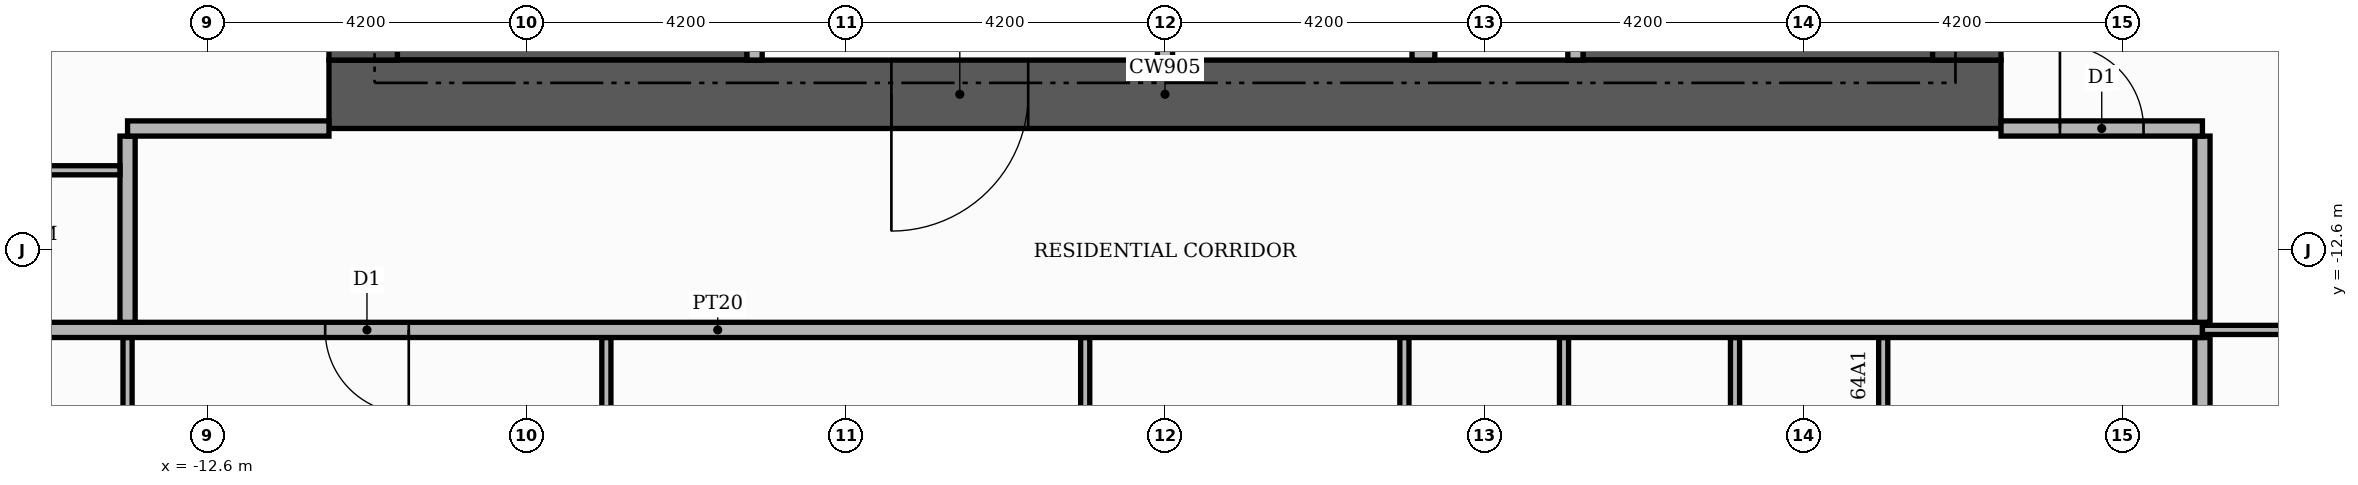
"""IFC4 building model, lengths in metres.
Left out: names, types, materials, properties, quantities, classifications, styles, units other than length and angle.
Written with IfcOpenShell. Run it as: python <this file> out.ifc"""

import sys

from ifc_helpers import new_model, si_unit, direction, frame, frame_2d, origin, place, context, subcontext, project, spatial, rectangle, extrude, element, fill, save


model = new_model("IFC4")
c1 = context("Model", 3, precision=1e-05, world=origin(), true_north=direction((0.0, 1.0)))
c2 = subcontext(c1, "Body", "Model", "MODEL_VIEW")
j1 = project(units=[si_unit("LENGTHUNIT", "METRE"), si_unit("PLANEANGLEUNIT", "RADIAN")], contexts=[c1])
p1 = place(None, origin())
s1 = spatial("IfcSite", under=j1, at=p1, CompositionType="ELEMENT")
p2 = place(p1, origin())
s2 = spatial("IfcBuilding", under=s1, at=p2, CompositionType="ELEMENT")
p3 = place(p2, frame((0.0, 0.0, 267.9)))
s3 = spatial("IfcBuildingStorey", under=s2, at=p3, CompositionType="ELEMENT", Elevation=267.9)
for number, where, z_axis, x_axis in (
    (1, (-10.1, -9.15, 0.0), (0.0, 0.0, 1.0), (1.0, 0.0, 0.0)),
    (2, (5.5, -9.15, 0.0), (0.0, 0.0, 1.0), (1.0, 0.0, 0.0)),
):
    element("IfcWall", number, at=place(p3, frame(where, z_axis=z_axis, x_axis=x_axis)), inside=s3, PredefinedType="SHEAR", context=c2, shape_type="SweptSolid", body=[
        extrude(rectangle(XDim=4.6, YDim=1.9, at=frame_2d((2.3, 0.0))), origin(), (0.0, 0.0, 1.0), 3.48),
    ])
p4 = place(p3, frame((-11.0, -10.55, 0.0), z_axis=(0.0, 0.0, 1.0), x_axis=(1.0, 0.0, 0.0)))
e3 = element("IfcWall", 3, at=p4, inside=s3, PredefinedType="SHEAR", context=c2, shape_type="SweptSolid", body=[
    extrude(rectangle(XDim=22.0, YDim=0.9, at=frame_2d((11.0, 0.0))), origin(), (0.0, 0.0, 1.0), 3.48),
])
p5 = place(p4, frame((7.4, 0.0, 0.0)))
e4 = element("IfcOpeningElement", 4, at=p5, cuts=e3, PredefinedType="OPENING", context=c2, shape_type="SweptSolid", body=[
    extrude(rectangle(XDim=1.8, YDim=2.2, at=frame_2d((0.9, 1.1))), frame((0.0, 0.46, 0.0), z_axis=(0.0, -1.0, 0.0), x_axis=(1.0, 0.0, 0.0)), (0.0, 0.0, 1.0), 0.92),
])
for number, where, z_axis, x_axis in (
    (5, (-10.55, -10.1, 0.0), (0.0, 0.0, 1.0), (0.0, 1.0, 0.0)),
    (6, (10.55, -10.1, 0.0), (0.0, 0.0, 1.0), (0.0, 1.0, 0.0)),
):
    element("IfcWall", number, at=place(p3, frame(where, z_axis=z_axis, x_axis=x_axis)), inside=s3, PredefinedType="SHEAR", context=c2, shape_type="SweptSolid", body=[
        extrude(rectangle(XDim=20.2, YDim=0.9, at=frame_2d((10.1, 0.0))), origin(), (0.0, 0.0, 1.0), 3.48),
    ])
p6 = place(p3, frame((-5.4, -10.1, 0.0), z_axis=(0.0, 0.0, 1.0), x_axis=(0.0, 1.0, 0.0)))
e7 = element("IfcWall", 7, at=p6, inside=s3, PredefinedType="PARTITIONING", context=c2, shape_type="SweptSolid", body=[
    extrude(rectangle(XDim=4.6, YDim=0.2, at=frame_2d((2.3, 0.0))), origin(), (0.0, 0.0, 1.0), 3.48),
])
p7 = place(p6, frame((2.9, 0.0, 0.0)))
e8 = element("IfcOpeningElement", 8, at=p7, cuts=e7, PredefinedType="OPENING", context=c2, shape_type="SweptSolid", body=[
    extrude(rectangle(XDim=1.0, YDim=2.1, at=frame_2d((0.5, 1.05))), frame((0.0, 0.11, 0.0), z_axis=(0.0, -1.0, 0.0), x_axis=(1.0, 0.0, 0.0)), (0.0, 0.0, 1.0), 0.22),
])
p8 = place(p3, frame((0.0, -10.1, 0.0), z_axis=(0.0, 0.0, 1.0), x_axis=(0.0, 1.0, 0.0)))
e9 = element("IfcWall", 9, at=p8, inside=s3, PredefinedType="PARTITIONING", context=c2, shape_type="SweptSolid", body=[
    extrude(rectangle(XDim=2.2, YDim=0.2, at=frame_2d((1.1, 0.0))), origin(), (0.0, 0.0, 1.0), 3.48),
])
p9 = place(p3, frame((3.4, -10.1, 0.0), z_axis=(0.0, 0.0, 1.0), x_axis=(0.0, 1.0, 0.0)))
e10 = element("IfcWall", 10, at=p9, inside=s3, PredefinedType="PARTITIONING", context=c2, shape_type="SweptSolid", body=[
    extrude(rectangle(XDim=2.2, YDim=0.3, at=frame_2d((1.1, 0.0))), origin(), (0.0, 0.0, 1.0), 3.48),
])
p10 = place(p3, frame((5.4, -10.1, 0.0), z_axis=(0.0, 0.0, 1.0), x_axis=(0.0, 1.0, 0.0)))
e11 = element("IfcWall", 11, at=p10, inside=s3, PredefinedType="PARTITIONING", context=c2, shape_type="SweptSolid", body=[
    extrude(rectangle(XDim=4.6, YDim=0.2, at=frame_2d((2.3, 0.0))), origin(), (0.0, 0.0, 1.0), 3.48),
])
p11 = place(p10, frame((2.9, 0.0, 0.0)))
e12 = element("IfcOpeningElement", 12, at=p11, cuts=e11, PredefinedType="OPENING", context=c2, shape_type="SweptSolid", body=[
    extrude(rectangle(XDim=1.0, YDim=2.1, at=frame_2d((0.5, 1.05))), frame((0.0, 0.11, 0.0), z_axis=(0.0, -1.0, 0.0), x_axis=(1.0, 0.0, 0.0)), (0.0, 0.0, 1.0), 0.22),
])
p12 = place(p3, frame((13.65, -25.42, 0.0), z_axis=(0.0, 0.0, 1.0), x_axis=(0.0, 1.0, 0.0)))
e13 = element("IfcWall", 13, at=p12, inside=s3, PredefinedType="PARTITIONING", context=c2, shape_type="SweptSolid", body=[
    extrude(rectangle(XDim=11.67, YDim=0.2, at=frame_2d((5.835, 0.0))), origin(), (0.0, 0.0, 1.0), 3.48),
])
p13 = place(p3, frame((-13.65, -20.06, 0.0), z_axis=(0.0, 0.0, 1.0), x_axis=(0.0, 1.0, 0.0)))
e14 = element("IfcWall", 14, at=p13, inside=s3, PredefinedType="PARTITIONING", context=c2, shape_type="SweptSolid", body=[
    extrude(rectangle(XDim=6.31, YDim=0.12, at=frame_2d((3.155, 0.0))), origin(), (0.0, 0.0, 1.0), 3.48),
])
p14 = place(p13, frame((2.675, 0.0, 0.0)))
e15 = element("IfcOpeningElement", 15, at=p14, cuts=e14, PredefinedType="OPENING", context=c2, shape_type="SweptSolid", body=[
    extrude(rectangle(XDim=1.0, YDim=2.1, at=frame_2d((0.5, 1.05))), frame((0.0, 0.07, 0.0), z_axis=(0.0, -1.0, 0.0), x_axis=(1.0, 0.0, 0.0)), (0.0, 0.0, 1.0), 0.14),
])
for number, where, z_axis, x_axis in (
    (16, (-7.35, -18.56, 0.0), (0.0, 0.0, 1.0), (0.0, 1.0, 0.0)),
    (17, (-1.05, -18.56, 0.0), (0.0, 0.0, 1.0), (0.0, 1.0, 0.0)),
    (18, (3.15, -18.56, 0.0), (0.0, 0.0, 1.0), (0.0, 1.0, 0.0)),
    (19, (5.25, -18.56, 0.0), (0.0, 0.0, 1.0), (0.0, 1.0, 0.0)),
    (20, (7.5, -18.56, 0.0), (0.0, 0.0, 1.0), (0.0, 1.0, 0.0)),
    (21, (9.45, -18.56, 0.0), (0.0, 0.0, 1.0), (0.0, 1.0, 0.0)),
):
    element("IfcWall", number, at=place(p3, frame(where, z_axis=z_axis, x_axis=x_axis)), inside=s3, PredefinedType="PARTITIONING", context=c2, shape_type="SweptSolid", body=[
        extrude(rectangle(XDim=4.81, YDim=0.12, at=frame_2d((2.405, 0.0))), origin(), (0.0, 0.0, 1.0), 3.48),
    ])
p15 = place(p3, frame((-25.42, -13.65, 0.0), z_axis=(0.0, 0.0, 1.0), x_axis=(1.0, 0.0, 0.0)))
e22 = element("IfcWall", 22, at=p15, inside=s3, PredefinedType="PARTITIONING", context=c2, shape_type="SweptSolid", body=[
    extrude(rectangle(XDim=39.07, YDim=0.2, at=frame_2d((19.535, 0.0))), origin(), (0.0, 0.0, 1.0), 3.48),
])
p16 = place(p15, frame((14.37, 0.0, 0.0)))
e23 = element("IfcOpeningElement", 23, at=p16, cuts=e22, PredefinedType="OPENING", context=c2, shape_type="SweptSolid", body=[
    extrude(rectangle(XDim=1.1, YDim=2.4, at=frame_2d((0.55, 1.2))), frame((0.0, 0.11, 0.0), z_axis=(0.0, -1.0, 0.0), x_axis=(1.0, 0.0, 0.0)), (0.0, 0.0, 1.0), 0.22),
])
p17 = place(p3, frame((13.65, -13.65, 0.0), z_axis=(0.0, 0.0, 1.0), x_axis=(1.0, 0.0, 0.0)))
e24 = element("IfcWall", 24, at=p17, inside=s3, PredefinedType="PARTITIONING", context=c2, shape_type="SweptSolid", body=[
    extrude(rectangle(XDim=6.17, YDim=0.12, at=frame_2d((3.085, 0.0))), origin(), (0.0, 0.0, 1.0), 3.48),
])
p18 = place(p17, frame((2.635, 0.0, 0.0)))
e25 = element("IfcOpeningElement", 25, at=p18, cuts=e24, PredefinedType="OPENING", context=c2, shape_type="SweptSolid", body=[
    extrude(rectangle(XDim=0.9, YDim=2.1, at=frame_2d((0.45, 1.05))), frame((0.0, 0.07, 0.0), z_axis=(0.0, -1.0, 0.0), x_axis=(1.0, 0.0, 0.0)), (0.0, 0.0, 1.0), 0.14),
])
for number, where, z_axis, x_axis in (
    (26, (-13.65, -13.55, 0.0), (0.0, 0.0, 1.0), (0.0, 1.0, 0.0)),
    (27, (13.65, -13.55, 0.0), (0.0, 0.0, 1.0), (0.0, 1.0, 0.0)),
):
    element("IfcWall", number, at=place(p3, frame(where, z_axis=z_axis, x_axis=x_axis)), inside=s3, PredefinedType="PARTITIONING", context=c2, shape_type="SweptSolid", body=[
        extrude(rectangle(XDim=2.45, YDim=0.2, at=frame_2d((1.225, 0.0))), origin(), (0.0, 0.0, 1.0), 3.48),
    ])
p19 = place(p3, frame((-18.92, -11.55, 0.0), z_axis=(0.0, 0.0, 1.0), x_axis=(1.0, 0.0, 0.0)))
e28 = element("IfcWall", 28, at=p19, inside=s3, PredefinedType="PARTITIONING", context=c2, shape_type="SweptSolid", body=[
    extrude(rectangle(XDim=5.17, YDim=0.12, at=frame_2d((2.585, 0.0))), origin(), (0.0, 0.0, 1.0), 3.48),
])
p20 = place(p3, frame((-13.65, -11.0, 0.0), z_axis=(0.0, 0.0, 1.0), x_axis=(1.0, 0.0, 0.0)))
e29 = element("IfcWall", 29, at=p20, inside=s3, PredefinedType="PARTITIONING", context=c2, shape_type="SweptSolid", body=[
    extrude(rectangle(XDim=2.65, YDim=0.2, at=frame_2d((1.325, 0.0))), origin(), (0.0, 0.0, 1.0), 3.48),
])
p21 = place(p3, frame((11.0, -11.0, 0.0), z_axis=(0.0, 0.0, 1.0), x_axis=(1.0, 0.0, 0.0)))
e30 = element("IfcWall", 30, at=p21, inside=s3, PredefinedType="PARTITIONING", context=c2, shape_type="SweptSolid", body=[
    extrude(rectangle(XDim=2.65, YDim=0.2, at=frame_2d((1.325, 0.0))), origin(), (0.0, 0.0, 1.0), 3.48),
])
p22 = place(p21, frame((0.775, 0.0, 0.0)))
e31 = element("IfcOpeningElement", 31, at=p22, cuts=e30, PredefinedType="OPENING", context=c2, shape_type="SweptSolid", body=[
    extrude(rectangle(XDim=1.1, YDim=2.4, at=frame_2d((0.55, 1.2))), frame((0.0, 0.11, 0.0), z_axis=(0.0, -1.0, 0.0), x_axis=(1.0, 0.0, 0.0)), (0.0, 0.0, 1.0), 0.22),
])
p23 = place(p5, frame((1.8, 0.0, 0.0), z_axis=(0.0, 0.0, 1.0), x_axis=(-1.0, 0.0, 0.0)))
e32 = element("IfcDoor", 32, at=p23, inside=s3, OperationType="DOUBLE_DOOR_SINGLE_SWING", PredefinedType="DOOR", context=c2, shape_type="SweptSolid", body=[
    extrude(rectangle(XDim=1.8, YDim=2.2, at=frame_2d((0.9, 1.1))), frame((0.0, 0.025, 0.0), z_axis=(0.0, -1.0, 0.0), x_axis=(1.0, 0.0, 0.0)), (0.0, 0.0, 1.0), 0.05),
])
fill(e4, e32)
p24 = place(p16, frame((1.1, 0.0, 0.0), z_axis=(0.0, 0.0, 1.0), x_axis=(-1.0, 0.0, 0.0)))
e33 = element("IfcDoor", 33, at=p24, inside=s3, OperationType="SINGLE_SWING_RIGHT", PredefinedType="DOOR", context=c2, shape_type="SweptSolid", body=[
    extrude(rectangle(XDim=1.1, YDim=2.4, at=frame_2d((0.55, 1.2))), frame((0.0, 0.025, 0.0), z_axis=(0.0, -1.0, 0.0), x_axis=(1.0, 0.0, 0.0)), (0.0, 0.0, 1.0), 0.05),
])
fill(e23, e33)
p25 = place(p22, origin())
e34 = element("IfcDoor", 34, at=p25, inside=s3, OperationType="SINGLE_SWING_LEFT", PredefinedType="DOOR", context=c2, shape_type="SweptSolid", body=[
    extrude(rectangle(XDim=1.1, YDim=2.4, at=frame_2d((0.55, 1.2))), frame((0.0, 0.025, 0.0), z_axis=(0.0, -1.0, 0.0), x_axis=(1.0, 0.0, 0.0)), (0.0, 0.0, 1.0), 0.05),
])
fill(e31, e34)
save(model, sys.argv[1])
